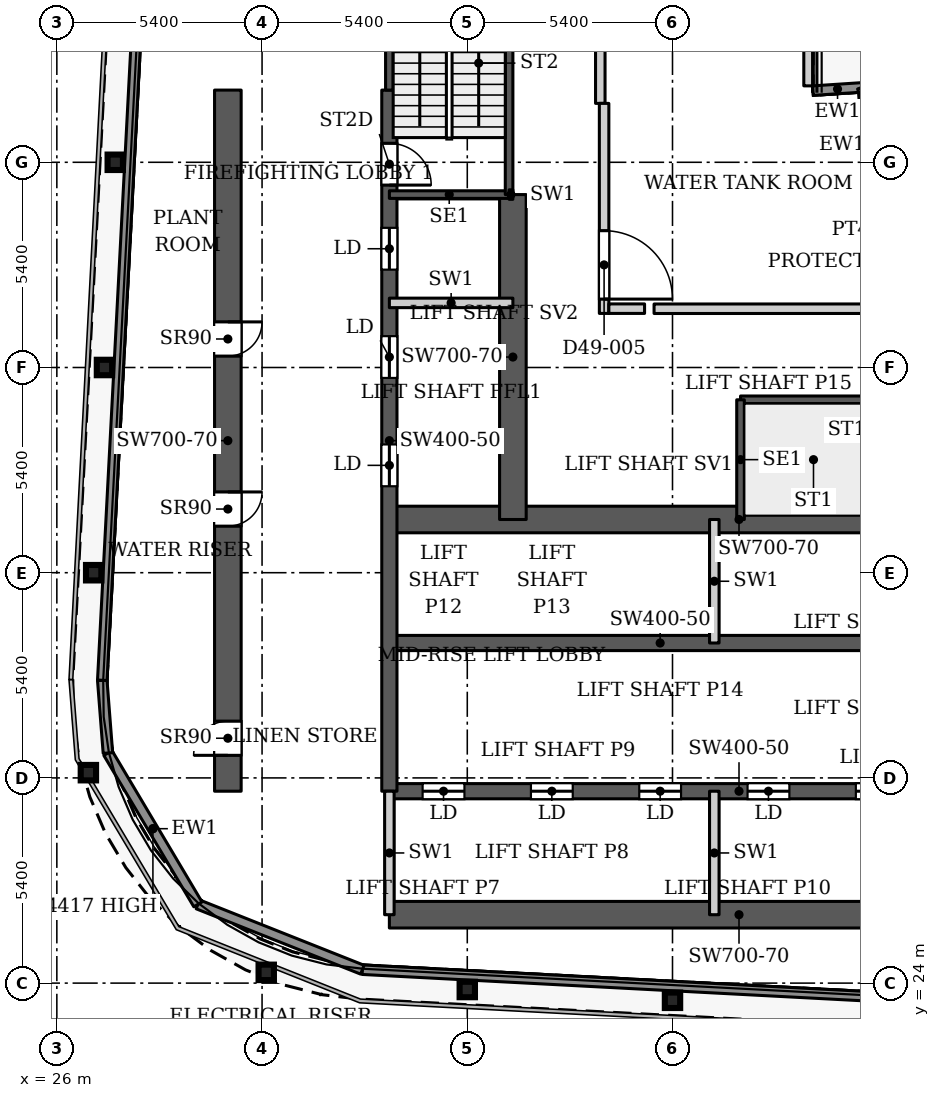
"""IFC4 building model, lengths in metres.
Left out: names, types, materials, properties, quantities, classifications, styles, units other than length and angle.
Written with IfcOpenShell. Run it as: python <this file> out.ifc"""

import sys

from ifc_helpers import new_model, si_unit, direction, frame, frame_2d, origin, origin_2d, place, context, subcontext, project, spatial, rectangle, i_section, extrude, source, transform, mapped, element, fill, save


model = new_model("IFC4")
c1 = context("Model", 3, precision=1e-05, world=origin(), true_north=direction((0.0, 1.0)))
c2 = subcontext(c1, "Body", "Model", "MODEL_VIEW")
j1 = project(units=[si_unit("LENGTHUNIT", "METRE"), si_unit("PLANEANGLEUNIT", "RADIAN")], contexts=[c1])
p1 = place(None, origin())
s1 = spatial("IfcSite", under=j1, at=p1, CompositionType="ELEMENT")
p2 = place(p1, origin())
s2 = spatial("IfcBuilding", under=s1, at=p2, CompositionType="ELEMENT")
p3 = place(p2, frame((0.0, 0.0, 211.1)))
s3 = spatial("IfcBuildingStorey", under=s2, at=p3, CompositionType="ELEMENT", Elevation=211.1)
for number, where, z_axis, x_axis in (
    (1, (42.2, 23.548, 0.0), (0.0, 0.0, 1.0), (1.0, 0.0, 0.0)),
    (2, (36.8, 23.832, 0.0), (0.0, 0.0, 1.0), (1.0, 0.0, 0.0)),
    (3, (31.51, 24.283, 0.0), (0.0, 0.0, 1.0), (1.0, 0.0, 0.0)),
    (4, (26.83, 29.538, 0.0), (0.0, 0.0, 1.0), (1.0, 0.0, 0.0)),
    (5, (26.969, 34.8, 0.0), (0.0, 0.0, 1.0), (1.0, 0.0, 0.0)),
    (6, (27.253, 40.2, 0.0), (0.0, 0.0, 1.0), (1.0, 0.0, 0.0)),
    (7, (27.537, 45.6, 0.0), (0.0, 0.0, 1.0), (1.0, 0.0, 0.0)),
):
    element("IfcColumn", number, at=place(p3, frame(where, z_axis=z_axis, x_axis=x_axis)), inside=s3, PredefinedType="COLUMN", context=c2, shape_type="SweptSolid", body=[
        extrude(i_section(OverallWidth=0.404, OverallDepth=0.407, WebThickness=0.027, FlangeThickness=0.044, FilletRadius=0.012, at=origin_2d()), origin(), (0.0, 0.0, 1.0), 5.1),
    ])
p4 = place(p3, frame((34.75, 25.8, 0.0), z_axis=(0.0, 0.0, 1.0), x_axis=(1.0, 0.0, 0.0)))
e8 = element("IfcWall", 8, at=p4, inside=s3, PredefinedType="SHEAR", context=c2, shape_type="SweptSolid", body=[
    extrude(rectangle(XDim=18.4, YDim=0.7, at=frame_2d((9.2, 0.0))), origin(), (0.0, 0.0, 1.0), 5.1),
])
p5 = place(p3, frame((34.75, 29.05, 0.0), z_axis=(0.0, 0.0, 1.0), x_axis=(1.0, 0.0, 0.0)))
e9 = element("IfcWall", 9, at=p5, inside=s3, PredefinedType="SHEAR", context=c2, shape_type="SweptSolid", body=[
    extrude(rectangle(XDim=18.4, YDim=0.4, at=frame_2d((9.2, 0.0))), origin(), (0.0, 0.0, 1.0), 5.1),
])
p6 = place(p5, frame((0.875, 0.0, 0.0)))
e10 = element("IfcOpeningElement", 10, at=p6, cuts=e9, PredefinedType="OPENING", context=c2, shape_type="SweptSolid", body=[
    extrude(rectangle(XDim=1.1, YDim=2.2, at=frame_2d((0.55, 1.1))), frame((0.0, 0.21, 0.0), z_axis=(0.0, -1.0, 0.0), x_axis=(1.0, 0.0, 0.0)), (0.0, 0.0, 1.0), 0.42),
])
p7 = place(p5, frame((3.725, 0.0, 0.0)))
e11 = element("IfcOpeningElement", 11, at=p7, cuts=e9, PredefinedType="OPENING", context=c2, shape_type="SweptSolid", body=[
    extrude(rectangle(XDim=1.1, YDim=2.2, at=frame_2d((0.55, 1.1))), frame((0.0, 0.21, 0.0), z_axis=(0.0, -1.0, 0.0), x_axis=(1.0, 0.0, 0.0)), (0.0, 0.0, 1.0), 0.42),
])
p8 = place(p5, frame((6.575, 0.0, 0.0)))
e12 = element("IfcOpeningElement", 12, at=p8, cuts=e9, PredefinedType="OPENING", context=c2, shape_type="SweptSolid", body=[
    extrude(rectangle(XDim=1.1, YDim=2.2, at=frame_2d((0.55, 1.1))), frame((0.0, 0.21, 0.0), z_axis=(0.0, -1.0, 0.0), x_axis=(1.0, 0.0, 0.0)), (0.0, 0.0, 1.0), 0.42),
])
p9 = place(p5, frame((9.425, 0.0, 0.0)))
e13 = element("IfcOpeningElement", 13, at=p9, cuts=e9, PredefinedType="OPENING", context=c2, shape_type="SweptSolid", body=[
    extrude(rectangle(XDim=1.1, YDim=2.2, at=frame_2d((0.55, 1.1))), frame((0.0, 0.21, 0.0), z_axis=(0.0, -1.0, 0.0), x_axis=(1.0, 0.0, 0.0)), (0.0, 0.0, 1.0), 0.42),
])
p10 = place(p5, frame((12.275, 0.0, 0.0)))
e14 = element("IfcOpeningElement", 14, at=p10, cuts=e9, PredefinedType="OPENING", context=c2, shape_type="SweptSolid", body=[
    extrude(rectangle(XDim=1.1, YDim=2.2, at=frame_2d((0.55, 1.1))), frame((0.0, 0.21, 0.0), z_axis=(0.0, -1.0, 0.0), x_axis=(1.0, 0.0, 0.0)), (0.0, 0.0, 1.0), 0.42),
])
p11 = place(p5, frame((15.125, 0.0, 0.0)))
e15 = element("IfcOpeningElement", 15, at=p11, cuts=e9, PredefinedType="OPENING", context=c2, shape_type="SweptSolid", body=[
    extrude(rectangle(XDim=1.1, YDim=2.2, at=frame_2d((0.55, 1.1))), frame((0.0, 0.21, 0.0), z_axis=(0.0, -1.0, 0.0), x_axis=(1.0, 0.0, 0.0)), (0.0, 0.0, 1.0), 0.42),
])
p12 = place(p3, frame((34.75, 32.95, 0.0), z_axis=(0.0, 0.0, 1.0), x_axis=(1.0, 0.0, 0.0)))
e16 = element("IfcWall", 16, at=p12, inside=s3, PredefinedType="SHEAR", context=c2, shape_type="SweptSolid", body=[
    extrude(rectangle(XDim=14.25, YDim=0.4, at=frame_2d((7.125, 0.0))), origin(), (0.0, 0.0, 1.0), 5.1),
])
p13 = place(p3, frame((34.75, 36.2, 0.0), z_axis=(0.0, 0.0, 1.0), x_axis=(1.0, 0.0, 0.0)))
e17 = element("IfcWall", 17, at=p13, inside=s3, PredefinedType="SHEAR", context=c2, shape_type="SweptSolid", body=[
    extrude(rectangle(XDim=18.4, YDim=0.7, at=frame_2d((9.2, 0.0))), origin(), (0.0, 0.0, 1.0), 5.1),
])
p14 = place(p13, frame((16.9, 0.0, 0.0)))
e18 = element("IfcOpeningElement", 18, at=p14, cuts=e17, PredefinedType="OPENING", context=c2, shape_type="SweptSolid", body=[
    extrude(rectangle(XDim=1.0, YDim=2.2, at=frame_2d((0.5, 1.1))), frame((0.0, 0.36, 0.0), z_axis=(0.0, -1.0, 0.0), x_axis=(1.0, 0.0, 0.0)), (0.0, 0.0, 1.0), 0.72),
])
p15 = place(p3, frame((34.75, 29.05, 0.0), z_axis=(0.0, 0.0, 1.0), x_axis=(0.0, 1.0, 0.0)))
e19 = element("IfcWall", 19, at=p15, inside=s3, PredefinedType="SHEAR", context=c2, shape_type="SweptSolid", body=[
    extrude(rectangle(XDim=18.45, YDim=0.4, at=frame_2d((9.225, 0.0))), origin(), (0.0, 0.0, 1.0), 5.1),
])
p16 = place(p15, frame((8.025, 0.0, 0.0)))
e20 = element("IfcOpeningElement", 20, at=p16, cuts=e19, PredefinedType="OPENING", context=c2, shape_type="SweptSolid", body=[
    extrude(rectangle(XDim=1.1, YDim=2.2, at=frame_2d((0.55, 1.1))), frame((0.0, 0.21, 0.0), z_axis=(0.0, -1.0, 0.0), x_axis=(1.0, 0.0, 0.0)), (0.0, 0.0, 1.0), 0.42),
])
p17 = place(p15, frame((10.875, 0.0, 0.0)))
e21 = element("IfcOpeningElement", 21, at=p17, cuts=e19, PredefinedType="OPENING", context=c2, shape_type="SweptSolid", body=[
    extrude(rectangle(XDim=1.1, YDim=2.2, at=frame_2d((0.55, 1.1))), frame((0.0, 0.21, 0.0), z_axis=(0.0, -1.0, 0.0), x_axis=(1.0, 0.0, 0.0)), (0.0, 0.0, 1.0), 0.42),
])
p18 = place(p15, frame((13.725, 0.0, 0.0)))
e22 = element("IfcOpeningElement", 22, at=p18, cuts=e19, PredefinedType="OPENING", context=c2, shape_type="SweptSolid", body=[
    extrude(rectangle(XDim=1.1, YDim=2.2, at=frame_2d((0.55, 1.1))), frame((0.0, 0.21, 0.0), z_axis=(0.0, -1.0, 0.0), x_axis=(1.0, 0.0, 0.0)), (0.0, 0.0, 1.0), 0.42),
])
p19 = place(p15, frame((15.95, 0.0, 0.0)))
e23 = element("IfcOpeningElement", 23, at=p19, cuts=e19, PredefinedType="OPENING", context=c2, shape_type="SweptSolid", body=[
    extrude(rectangle(XDim=1.1, YDim=2.2, at=frame_2d((0.55, 1.1))), frame((0.0, 0.21, 0.0), z_axis=(0.0, -1.0, 0.0), x_axis=(1.0, 0.0, 0.0)), (0.0, 0.0, 1.0), 0.42),
])
p20 = place(p3, frame((38.0, 36.2, 0.0), z_axis=(0.0, 0.0, 1.0), x_axis=(0.0, 1.0, 0.0)))
e24 = element("IfcWall", 24, at=p20, inside=s3, PredefinedType="SHEAR", context=c2, shape_type="SweptSolid", body=[
    extrude(rectangle(XDim=8.55, YDim=0.7, at=frame_2d((4.275, 0.0))), origin(), (0.0, 0.0, 1.0), 5.1),
])
p21 = place(p3, frame((30.5, 29.05, 0.0), z_axis=(0.0, 0.0, 1.0), x_axis=(0.0, 1.0, 0.0)))
e25 = element("IfcWall", 25, at=p21, inside=s3, PredefinedType="SHEAR", context=c2, shape_type="SweptSolid", body=[
    extrude(rectangle(XDim=18.45, YDim=0.7, at=frame_2d((9.225, 0.0))), origin(), (0.0, 0.0, 1.0), 5.1),
])
p22 = place(p21, frame((0.944, 0.0, 0.0)))
e26 = element("IfcOpeningElement", 26, at=p22, cuts=e25, PredefinedType="OPENING", context=c2, shape_type="SweptSolid", body=[
    extrude(rectangle(XDim=0.9, YDim=2.2, at=frame_2d((0.45, 1.1))), frame((0.0, 0.36, 0.0), z_axis=(0.0, -1.0, 0.0), x_axis=(1.0, 0.0, 0.0)), (0.0, 0.0, 1.0), 0.72),
])
p23 = place(p21, frame((6.975, 0.0, 0.0)))
e27 = element("IfcOpeningElement", 27, at=p23, cuts=e25, PredefinedType="OPENING", context=c2, shape_type="SweptSolid", body=[
    extrude(rectangle(XDim=0.9, YDim=2.2, at=frame_2d((0.45, 1.1))), frame((0.0, 0.36, 0.0), z_axis=(0.0, -1.0, 0.0), x_axis=(1.0, 0.0, 0.0)), (0.0, 0.0, 1.0), 0.72),
])
p24 = place(p21, frame((11.45, 0.0, 0.0)))
e28 = element("IfcOpeningElement", 28, at=p24, cuts=e25, PredefinedType="OPENING", context=c2, shape_type="SweptSolid", body=[
    extrude(rectangle(XDim=0.9, YDim=2.2, at=frame_2d((0.45, 1.1))), frame((0.0, 0.36, 0.0), z_axis=(0.0, -1.0, 0.0), x_axis=(1.0, 0.0, 0.0)), (0.0, 0.0, 1.0), 0.72),
])
p25 = place(p3, frame((84.427, 21.701, 0.0), z_axis=(0.0, 0.0, 1.0), x_axis=(-0.998617722402, 0.052560864767, 0.0)))
e29 = element("IfcWall", 29, at=p25, inside=s3, PredefinedType="SOLIDWALL", context=c2, shape_type="SweptSolid", body=[
    extrude(rectangle(XDim=50.458, YDim=0.25, at=frame_2d((25.229, 0.0))), origin(), (0.0, 0.0, 1.0), 4.95),
])
p26 = place(p3, frame((34.039, 24.353, 0.0), z_axis=(0.0, 0.0, 1.0), x_axis=(-0.929352825399, 0.369192803184, 0.0)))
e30 = element("IfcWall", 30, at=p26, inside=s3, PredefinedType="SOLIDWALL", context=c2, shape_type="SweptSolid", body=[
    extrude(rectangle(XDim=4.656, YDim=0.25, at=frame_2d((2.328, 0.0))), origin(), (0.0, 0.0, 1.0), 4.95),
])
p27 = place(p3, frame((29.712, 26.072, 0.0), z_axis=(0.0, 0.0, 1.0), x_axis=(-0.511028049012, 0.859564036662, 0.0)))
e31 = element("IfcWall", 31, at=p27, inside=s3, PredefinedType="SOLIDWALL", context=c2, shape_type="SweptSolid", body=[
    extrude(rectangle(XDim=4.634, YDim=0.25, at=frame_2d((2.317, 0.0))), origin(), (0.0, 0.0, 1.0), 4.417),
])
p28 = place(p3, frame((27.344, 30.055, 0.0), z_axis=(0.0, 0.0, 1.0), x_axis=(-0.077571675317, 0.99698677784, 0.0)))
e32 = element("IfcWall", 32, at=p28, inside=s3, PredefinedType="SOLIDWALL", context=c2, shape_type="SweptSolid", body=[
    extrude(rectangle(XDim=1.92, YDim=0.25, at=frame_2d((0.96, 0.0))), origin(), (0.0, 0.0, 1.0), 4.95),
])
p29 = place(p3, frame((27.195, 31.969, 0.0), z_axis=(0.0, 0.0, 1.0), x_axis=(0.052556141556, 0.99861797099, 0.0)))
e33 = element("IfcWall", 33, at=p29, inside=s3, PredefinedType="SOLIDWALL", context=c2, shape_type="SweptSolid", body=[
    extrude(rectangle(XDim=66.651, YDim=0.25, at=frame_2d((33.326, 0.0))), origin(), (0.0, 0.0, 1.0), 4.95),
])
p30 = place(p3, frame((45.897, 47.486, 0.0), z_axis=(0.0, 0.0, 1.0), x_axis=(0.997841571158, 0.065667334864, 0.0)))
e34 = element("IfcWall", 34, at=p30, inside=s3, PredefinedType="SOLIDWALL", context=c2, shape_type="SweptSolid", body=[
    extrude(rectangle(XDim=1.294, YDim=0.25, at=frame_2d((0.647, 0.0))), origin(), (0.0, 0.0, 1.0), 4.95),
])
p31 = place(p3, frame((47.188, 47.571, 0.0), z_axis=(0.0, 0.0, 1.0), x_axis=(0.331615835646, -0.943414509931, 0.0)))
e35 = element("IfcWall", 35, at=p31, inside=s3, PredefinedType="SOLIDWALL", context=c2, shape_type="SweptSolid", body=[
    extrude(rectangle(XDim=1.538, YDim=0.25, at=frame_2d((0.769, 0.0))), origin(), (0.0, 0.0, 1.0), 4.95),
])
p32 = place(p3, frame((43.99, 39.35, 0.0), z_axis=(0.0, 0.0, 1.0), x_axis=(1.0, 0.0, 0.0)))
e36 = element("IfcWall", 36, at=p32, inside=s3, PredefinedType="SHEAR", context=c2, shape_type="SweptSolid", body=[
    extrude(rectangle(XDim=9.16, YDim=0.2, at=frame_2d((4.58, 0.0))), origin(), (0.0, 0.0, 1.0), 5.1),
])
p33 = place(p3, frame((43.99, 36.2, 0.0), z_axis=(0.0, 0.0, 1.0), x_axis=(0.0, 1.0, 0.0)))
e37 = element("IfcWall", 37, at=p33, inside=s3, PredefinedType="SHEAR", context=c2, shape_type="SweptSolid", body=[
    extrude(rectangle(XDim=3.15, YDim=0.2, at=frame_2d((1.575, 0.0))), origin(), (0.0, 0.0, 1.0), 5.1),
])
p34 = place(p3, frame((34.75, 44.75, 0.0), z_axis=(0.0, 0.0, 1.0), x_axis=(1.0, 0.0, 0.0)))
e38 = element("IfcWall", 38, at=p34, inside=s3, PredefinedType="SHEAR", context=c2, shape_type="SweptSolid", body=[
    extrude(rectangle(XDim=3.15, YDim=0.2, at=frame_2d((1.575, 0.0))), origin(), (0.0, 0.0, 1.0), 5.1),
])
p35 = place(p3, frame((34.75, 47.5, 0.0), z_axis=(0.0, 0.0, 1.0), x_axis=(0.0, 1.0, 0.0)))
e39 = element("IfcWall", 39, at=p35, inside=s3, PredefinedType="SHEAR", context=c2, shape_type="SweptSolid", body=[
    extrude(rectangle(XDim=6.41, YDim=0.2, at=frame_2d((3.205, 0.0))), origin(), (0.0, 0.0, 1.0), 5.1),
])
p36 = place(p3, frame((37.9, 44.75, 0.0), z_axis=(0.0, 0.0, 1.0), x_axis=(0.0, 1.0, 0.0)))
e40 = element("IfcWall", 40, at=p36, inside=s3, PredefinedType="SHEAR", context=c2, shape_type="SweptSolid", body=[
    extrude(rectangle(XDim=9.16, YDim=0.2, at=frame_2d((4.58, 0.0))), origin(), (0.0, 0.0, 1.0), 5.1),
])
for number, where, z_axis, x_axis in (
    (41, (34.75, 25.8, 0.0), (0.0, 0.0, 1.0), (0.0, 1.0, 0.0)),
    (42, (43.3, 25.8, 0.0), (0.0, 0.0, 1.0), (0.0, 1.0, 0.0)),
    (43, (43.3, 32.95, 0.0), (0.0, 0.0, 1.0), (0.0, 1.0, 0.0)),
    (44, (34.75, 41.9, 0.0), (0.0, 0.0, 1.0), (1.0, 0.0, 0.0)),
):
    element("IfcWall", number, at=place(p3, frame(where, z_axis=z_axis, x_axis=x_axis)), inside=s3, PredefinedType="PARTITIONING", context=c2, shape_type="SweptSolid", body=[
        extrude(rectangle(XDim=3.25, YDim=0.25, at=frame_2d((1.625, 0.0))), origin(), (0.0, 0.0, 1.0), 5.1),
    ])
p37 = place(p3, frame((37.9, 44.75, 0.0), z_axis=(0.0, 0.0, 1.0), x_axis=(1.0, 0.0, 0.0)))
e45 = element("IfcWall", 45, at=p37, inside=s3, PredefinedType="PARTITIONING", context=c2, shape_type="SweptSolid", body=[
    extrude(rectangle(XDim=0.1, YDim=0.25, at=frame_2d((0.05, 0.0))), origin(), (0.0, 0.0, 1.0), 5.1),
])
p38 = place(p3, frame((40.3, 47.15, 0.0), z_axis=(0.0, 0.0, 1.0), x_axis=(0.0, 1.0, 0.0)))
e46 = element("IfcWall", 46, at=p38, inside=s3, PredefinedType="PARTITIONING", context=c2, shape_type="SweptSolid", body=[
    extrude(rectangle(XDim=9.285, YDim=0.25, at=frame_2d((4.643, 0.0))), origin(), (0.0, 0.0, 1.0), 4.8),
])
p39 = place(p38, frame((4.812, 0.0, 0.0)))
e47 = element("IfcOpeningElement", 47, at=p39, cuts=e46, PredefinedType="OPENING", context=c2, shape_type="SweptSolid", body=[
    extrude(rectangle(XDim=1.2, YDim=2.1, at=frame_2d((0.6, 1.05))), frame((0.0, 0.135, 0.0), z_axis=(0.0, -1.0, 0.0), x_axis=(1.0, 0.0, 0.0)), (0.0, 0.0, 1.0), 0.27),
])
p40 = place(p3, frame((40.4, 41.623, 0.0), z_axis=(0.0, 0.0, 1.0), x_axis=(0.0, 1.0, 0.0)))
e48 = element("IfcWall", 48, at=p40, inside=s3, PredefinedType="PARTITIONING", context=c2, shape_type="SweptSolid", body=[
    extrude(rectangle(XDim=5.527, YDim=0.25, at=frame_2d((2.763, 0.0))), origin(), (0.0, 0.0, 1.0), 4.8),
])
p41 = place(p40, frame((0.377, 0.0, 0.0)))
e49 = element("IfcOpeningElement", 49, at=p41, cuts=e48, PredefinedType="OPENING", context=c2, shape_type="SweptSolid", body=[
    extrude(rectangle(XDim=1.8, YDim=2.1, at=frame_2d((0.9, 1.05))), frame((0.0, 0.135, 0.0), z_axis=(0.0, -1.0, 0.0), x_axis=(1.0, 0.0, 0.0)), (0.0, 0.0, 1.0), 0.27),
])
p42 = place(p3, frame((40.525, 41.748, 0.0), z_axis=(0.0, 0.0, 1.0), x_axis=(1.0, 0.0, 0.0)))
e50 = element("IfcWall", 50, at=p42, inside=s3, PredefinedType="PARTITIONING", context=c2, shape_type="SweptSolid", body=[
    extrude(rectangle(XDim=0.94, YDim=0.25, at=frame_2d((0.47, 0.0))), origin(), (0.0, 0.0, 1.0), 4.8),
])
p43 = place(p3, frame((41.715, 41.746, 0.0), z_axis=(0.0, 0.0, 1.0), x_axis=(0.999999989853, 0.000142460288, 0.0)))
e51 = element("IfcWall", 51, at=p43, inside=s3, PredefinedType="PARTITIONING", context=c2, shape_type="SweptSolid", body=[
    extrude(rectangle(XDim=13.71, YDim=0.25, at=frame_2d((6.855, 0.0))), origin(), (0.0, 0.0, 1.0), 4.8),
])
p44 = place(p3, frame((45.78, 47.611, 0.0), z_axis=(0.0, 0.0, 1.0), x_axis=(0.0, 1.0, 0.0)))
e52 = element("IfcWall", 52, at=p44, inside=s3, PredefinedType="PARTITIONING", context=c2, shape_type="SweptSolid", body=[
    extrude(rectangle(XDim=11.413, YDim=0.25, at=frame_2d((5.707, 0.0))), origin(), (0.0, 0.0, 1.0), 4.8),
])
m1 = source(origin(), c2, "Body", "SweptSolid", [
    extrude(rectangle(XDim=1.1, YDim=2.2, at=frame_2d((0.55, 1.1))), frame((0.0, 0.025, 0.0), z_axis=(0.0, -1.0, 0.0), x_axis=(1.0, 0.0, 0.0)), (0.0, 0.0, 1.0), 0.05),
])
p45 = place(p6, origin())
e53 = element("IfcDoor", 53, at=p45, inside=s3, OperationType="SLIDING_TO_LEFT", PredefinedType="DOOR", context=c2, shape_type="MappedRepresentation", body=[
    mapped(m1, transform((0.0, 0.0, 0.0), x_axis=(1.0, 0.0, 0.0), y_axis=(0.0, 1.0, 0.0), z_axis=(0.0, 0.0, 1.0), scale=1.0)),
])
fill(e10, e53)
p46 = place(p7, origin())
e54 = element("IfcDoor", 54, at=p46, inside=s3, OperationType="SLIDING_TO_LEFT", PredefinedType="DOOR", context=c2, shape_type="MappedRepresentation", body=[
    mapped(m1, transform((0.0, 0.0, 0.0), x_axis=(1.0, 0.0, 0.0), y_axis=(0.0, 1.0, 0.0), z_axis=(0.0, 0.0, 1.0), scale=1.0)),
])
fill(e11, e54)
p47 = place(p8, origin())
e55 = element("IfcDoor", 55, at=p47, inside=s3, OperationType="SLIDING_TO_LEFT", PredefinedType="DOOR", context=c2, shape_type="MappedRepresentation", body=[
    mapped(m1, transform((0.0, 0.0, 0.0), x_axis=(1.0, 0.0, 0.0), y_axis=(0.0, 1.0, 0.0), z_axis=(0.0, 0.0, 1.0), scale=1.0)),
])
fill(e12, e55)
p48 = place(p9, origin())
e56 = element("IfcDoor", 56, at=p48, inside=s3, OperationType="SLIDING_TO_LEFT", PredefinedType="DOOR", context=c2, shape_type="MappedRepresentation", body=[
    mapped(m1, transform((0.0, 0.0, 0.0), x_axis=(1.0, 0.0, 0.0), y_axis=(0.0, 1.0, 0.0), z_axis=(0.0, 0.0, 1.0), scale=1.0)),
])
fill(e13, e56)
p49 = place(p10, origin())
e57 = element("IfcDoor", 57, at=p49, inside=s3, OperationType="SLIDING_TO_LEFT", PredefinedType="DOOR", context=c2, shape_type="MappedRepresentation", body=[
    mapped(m1, transform((0.0, 0.0, 0.0), x_axis=(1.0, 0.0, 0.0), y_axis=(0.0, 1.0, 0.0), z_axis=(0.0, 0.0, 1.0), scale=1.0)),
])
fill(e14, e57)
p50 = place(p16, origin())
e58 = element("IfcDoor", 58, at=p50, inside=s3, OperationType="SLIDING_TO_LEFT", PredefinedType="DOOR", context=c2, shape_type="MappedRepresentation", body=[
    mapped(m1, transform((0.0, 0.0, 0.0), x_axis=(1.0, 0.0, 0.0), y_axis=(0.0, 1.0, 0.0), z_axis=(0.0, 0.0, 1.0), scale=1.0)),
])
fill(e20, e58)
p51 = place(p17, origin())
e59 = element("IfcDoor", 59, at=p51, inside=s3, OperationType="SLIDING_TO_LEFT", PredefinedType="DOOR", context=c2, shape_type="MappedRepresentation", body=[
    mapped(m1, transform((0.0, 0.0, 0.0), x_axis=(1.0, 0.0, 0.0), y_axis=(0.0, 1.0, 0.0), z_axis=(0.0, 0.0, 1.0), scale=1.0)),
])
fill(e21, e59)
p52 = place(p18, origin())
e60 = element("IfcDoor", 60, at=p52, inside=s3, OperationType="SLIDING_TO_LEFT", PredefinedType="DOOR", context=c2, shape_type="MappedRepresentation", body=[
    mapped(m1, transform((0.0, 0.0, 0.0), x_axis=(1.0, 0.0, 0.0), y_axis=(0.0, 1.0, 0.0), z_axis=(0.0, 0.0, 1.0), scale=1.0)),
])
fill(e22, e60)
m2 = source(origin(), c2, "Body", "SweptSolid", [
    extrude(rectangle(XDim=0.9, YDim=2.2, at=frame_2d((0.45, 1.1))), frame((0.0, 0.025, 0.0), z_axis=(0.0, -1.0, 0.0), x_axis=(1.0, 0.0, 0.0)), (0.0, 0.0, 1.0), 0.05),
])
p53 = place(p22, origin())
e61 = element("IfcDoor", 61, at=p53, inside=s3, OperationType="SINGLE_SWING_LEFT", PredefinedType="DOOR", context=c2, shape_type="MappedRepresentation", body=[
    mapped(m2, transform((0.0, 0.0, 0.0), x_axis=(1.0, 0.0, 0.0), y_axis=(0.0, 1.0, 0.0), z_axis=(0.0, 0.0, 1.0), scale=1.0)),
])
fill(e26, e61)
p54 = place(p23, origin())
e62 = element("IfcDoor", 62, at=p54, inside=s3, OperationType="SINGLE_SWING_RIGHT", PredefinedType="DOOR", context=c2, shape_type="MappedRepresentation", body=[
    mapped(m2, transform((0.0, 0.0, 0.0), x_axis=(1.0, 0.0, 0.0), y_axis=(0.0, 1.0, 0.0), z_axis=(0.0, 0.0, 1.0), scale=1.0)),
])
fill(e27, e62)
p55 = place(p24, origin())
e63 = element("IfcDoor", 63, at=p55, inside=s3, OperationType="SINGLE_SWING_RIGHT", PredefinedType="DOOR", context=c2, shape_type="MappedRepresentation", body=[
    mapped(m2, transform((0.0, 0.0, 0.0), x_axis=(1.0, 0.0, 0.0), y_axis=(0.0, 1.0, 0.0), z_axis=(0.0, 0.0, 1.0), scale=1.0)),
])
fill(e28, e63)
m3 = source(origin(), c2, "Body", "SweptSolid", [
    extrude(rectangle(XDim=1.1, YDim=2.2, at=frame_2d((0.55, 1.1))), frame((0.0, 0.025, 0.0), z_axis=(0.0, -1.0, 0.0), x_axis=(1.0, 0.0, 0.0)), (0.0, 0.0, 1.0), 0.05),
])
p56 = place(p19, origin())
e64 = element("IfcDoor", 64, at=p56, inside=s3, OperationType="SINGLE_SWING_RIGHT", PredefinedType="DOOR", context=c2, shape_type="MappedRepresentation", body=[
    mapped(m3, transform((0.0, 0.0, 0.0), x_axis=(1.0, 0.0, 0.0), y_axis=(0.0, 1.0, 0.0), z_axis=(0.0, 0.0, 1.0), scale=1.0)),
])
fill(e23, e64)
m4 = source(origin(), c2, "Body", "SweptSolid", [
    extrude(rectangle(XDim=1.8, YDim=2.1, at=frame_2d((0.9, 1.05))), frame((0.0, 0.025, 0.0), z_axis=(0.0, -1.0, 0.0), x_axis=(1.0, 0.0, 0.0)), (0.0, 0.0, 1.0), 0.05),
])
p57 = place(p41, origin())
e65 = element("IfcDoor", 65, at=p57, inside=s3, OperationType="DOUBLE_DOOR_SINGLE_SWING", PredefinedType="DOOR", context=c2, shape_type="MappedRepresentation", body=[
    mapped(m4, transform((0.0, 0.0, 0.0), x_axis=(1.0, 0.0, 0.0), y_axis=(0.0, 1.0, 0.0), z_axis=(0.0, 0.0, 1.0), scale=1.0)),
])
fill(e49, e65)
save(model, sys.argv[1])
